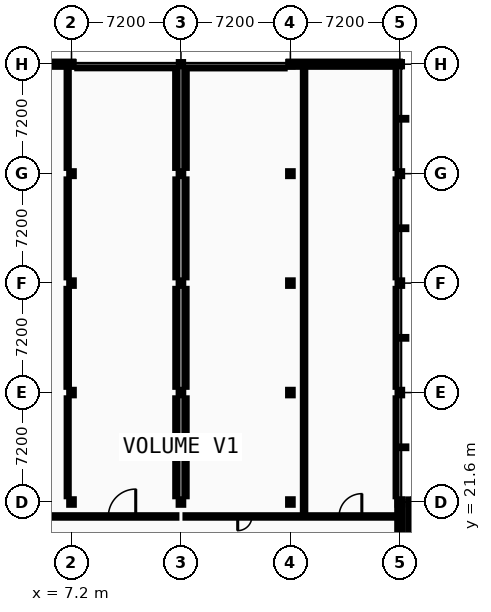
"""IFC4 building model, lengths in metres.
Left out: names, types, materials, properties, quantities, classifications, styles, units other than length and angle.
Written with IfcOpenShell. Run it as: python <this file> out.ifc"""

import sys

from ifc_helpers import new_model, si_unit, direction, frame, frame_2d, origin, origin_2d, place, context, subcontext, project, spatial, rectangle, i_section, extrude, element, fill, save


model = new_model("IFC4")
c1 = context("Model", 3, precision=1e-05, world=origin(), true_north=direction((0.0, 1.0)))
c2 = subcontext(c1, "Body", "Model", "MODEL_VIEW")
j1 = project(units=[si_unit("LENGTHUNIT", "METRE"), si_unit("PLANEANGLEUNIT", "RADIAN")], contexts=[c1])
p1 = place(None, origin())
s1 = spatial("IfcSite", under=j1, at=p1, CompositionType="ELEMENT")
p2 = place(p1, origin())
s2 = spatial("IfcBuilding", under=s1, at=p2, CompositionType="ELEMENT")
p3 = place(p2, frame((0.0, 0.0, 18.4)))
s3 = spatial("IfcBuildingStorey", under=s2, at=p3, CompositionType="ELEMENT", Elevation=18.4)
for number, where, z_axis, x_axis in (
    (1, (7.2, 21.6, 0.0), (0.0, 0.0, 1.0), (1.0, 0.0, 0.0)),
    (2, (7.2, 28.8, 0.0), (0.0, 0.0, 1.0), (1.0, 0.0, 0.0)),
    (3, (7.2, 36.0, 0.0), (0.0, 0.0, 1.0), (1.0, 0.0, 0.0)),
):
    element("IfcColumn", number, at=place(p3, frame(where, z_axis=z_axis, x_axis=x_axis)), inside=s3, PredefinedType="COLUMN", context=c2, shape_type="SweptSolid", body=[
        extrude(i_section(OverallWidth=0.3, OverallDepth=0.36, WebThickness=0.012, FlangeThickness=0.022, FilletRadius=0.027, at=origin_2d()), origin(), (0.0, 0.0, 1.0), 4.4),
    ])
p4 = place(p3, frame((7.2, 43.2, 0.0), z_axis=(0.0, 0.0, 1.0), x_axis=(1.0, 0.0, 0.0)))
e4 = element("IfcColumn", 4, at=p4, inside=s3, PredefinedType="COLUMN", context=c2, shape_type="SweptSolid", body=[
    extrude(i_section(OverallWidth=0.3, OverallDepth=0.32, WebThickness=0.011, FlangeThickness=0.021, FilletRadius=0.027, at=origin_2d()), origin(), (0.0, 0.0, 1.0), 4.4),
])
p5 = place(p3, frame((7.2, 50.4, 0.0), z_axis=(0.0, 0.0, 1.0), x_axis=(1.0, 0.0, 0.0)))
e5 = element("IfcColumn", 5, at=p5, inside=s3, PredefinedType="COLUMN", context=c2, shape_type="SweptSolid", body=[
    extrude(i_section(OverallWidth=0.28, OverallDepth=0.28, WebThickness=0.01, FlangeThickness=0.018, FilletRadius=0.024, at=origin_2d()), origin(), (0.0, 0.0, 1.0), 4.4),
])
for number, where, z_axis, x_axis in (
    (6, (14.4, 21.6, 0.0), (0.0, 0.0, 1.0), (1.0, 0.0, 0.0)),
    (7, (14.4, 28.8, 0.0), (0.0, 0.0, 1.0), (1.0, 0.0, 0.0)),
    (8, (14.4, 36.0, 0.0), (0.0, 0.0, 1.0), (1.0, 0.0, 0.0)),
):
    element("IfcColumn", number, at=place(p3, frame(where, z_axis=z_axis, x_axis=x_axis)), inside=s3, PredefinedType="COLUMN", context=c2, shape_type="SweptSolid", body=[
        extrude(i_section(OverallWidth=0.3, OverallDepth=0.36, WebThickness=0.012, FlangeThickness=0.022, FilletRadius=0.027, at=origin_2d()), origin(), (0.0, 0.0, 1.0), 4.4),
    ])
p6 = place(p3, frame((14.4, 43.2, 0.0), z_axis=(0.0, 0.0, 1.0), x_axis=(1.0, 0.0, 0.0)))
e9 = element("IfcColumn", 9, at=p6, inside=s3, PredefinedType="COLUMN", context=c2, shape_type="SweptSolid", body=[
    extrude(i_section(OverallWidth=0.3, OverallDepth=0.32, WebThickness=0.011, FlangeThickness=0.021, FilletRadius=0.027, at=origin_2d()), origin(), (0.0, 0.0, 1.0), 4.4),
])
p7 = place(p3, frame((14.4, 50.4, 0.0), z_axis=(0.0, 0.0, 1.0), x_axis=(1.0, 0.0, 0.0)))
e10 = element("IfcColumn", 10, at=p7, inside=s3, PredefinedType="COLUMN", context=c2, shape_type="SweptSolid", body=[
    extrude(i_section(OverallWidth=0.28, OverallDepth=0.28, WebThickness=0.01, FlangeThickness=0.018, FilletRadius=0.024, at=origin_2d()), origin(), (0.0, 0.0, 1.0), 4.4),
])
for number, where, z_axis, x_axis in (
    (11, (21.6, 21.6, 0.0), (0.0, 0.0, 1.0), (1.0, 0.0, 0.0)),
    (12, (21.6, 28.8, 0.0), (0.0, 0.0, 1.0), (1.0, 0.0, 0.0)),
    (13, (21.6, 36.0, 0.0), (0.0, 0.0, 1.0), (1.0, 0.0, 0.0)),
):
    element("IfcColumn", number, at=place(p3, frame(where, z_axis=z_axis, x_axis=x_axis)), inside=s3, PredefinedType="COLUMN", context=c2, shape_type="SweptSolid", body=[
        extrude(i_section(OverallWidth=0.3, OverallDepth=0.36, WebThickness=0.012, FlangeThickness=0.022, FilletRadius=0.027, at=origin_2d()), origin(), (0.0, 0.0, 1.0), 4.4),
    ])
p8 = place(p3, frame((21.6, 43.2, 0.0), z_axis=(0.0, 0.0, 1.0), x_axis=(1.0, 0.0, 0.0)))
e14 = element("IfcColumn", 14, at=p8, inside=s3, PredefinedType="COLUMN", context=c2, shape_type="SweptSolid", body=[
    extrude(i_section(OverallWidth=0.3, OverallDepth=0.32, WebThickness=0.011, FlangeThickness=0.021, FilletRadius=0.027, at=origin_2d()), origin(), (0.0, 0.0, 1.0), 4.4),
])
p9 = place(p3, frame((21.6, 50.4, 0.0), z_axis=(0.0, 0.0, 1.0), x_axis=(1.0, 0.0, 0.0)))
e15 = element("IfcColumn", 15, at=p9, inside=s3, PredefinedType="COLUMN", context=c2, shape_type="SweptSolid", body=[
    extrude(i_section(OverallWidth=0.28, OverallDepth=0.28, WebThickness=0.01, FlangeThickness=0.018, FilletRadius=0.024, at=origin_2d()), origin(), (0.0, 0.0, 1.0), 4.4),
])
for number, where, z_axis, x_axis in (
    (16, (28.8, 21.6, 0.0), (0.0, 0.0, 1.0), (1.0, 0.0, 0.0)),
    (17, (28.8, 28.8, 0.0), (0.0, 0.0, 1.0), (1.0, 0.0, 0.0)),
    (18, (28.8, 36.0, 0.0), (0.0, 0.0, 1.0), (1.0, 0.0, 0.0)),
):
    element("IfcColumn", number, at=place(p3, frame(where, z_axis=z_axis, x_axis=x_axis)), inside=s3, PredefinedType="COLUMN", context=c2, shape_type="SweptSolid", body=[
        extrude(i_section(OverallWidth=0.3, OverallDepth=0.36, WebThickness=0.012, FlangeThickness=0.022, FilletRadius=0.027, at=origin_2d()), origin(), (0.0, 0.0, 1.0), 4.4),
    ])
p10 = place(p3, frame((28.8, 43.2, 0.0), z_axis=(0.0, 0.0, 1.0), x_axis=(1.0, 0.0, 0.0)))
e19 = element("IfcColumn", 19, at=p10, inside=s3, PredefinedType="COLUMN", context=c2, shape_type="SweptSolid", body=[
    extrude(i_section(OverallWidth=0.3, OverallDepth=0.32, WebThickness=0.011, FlangeThickness=0.021, FilletRadius=0.027, at=origin_2d()), origin(), (0.0, 0.0, 1.0), 4.4),
])
p11 = place(p3, frame((28.8, 50.4, 0.0), z_axis=(0.0, 0.0, 1.0), x_axis=(1.0, 0.0, 0.0)))
e20 = element("IfcColumn", 20, at=p11, inside=s3, PredefinedType="COLUMN", context=c2, shape_type="SweptSolid", body=[
    extrude(i_section(OverallWidth=0.28, OverallDepth=0.28, WebThickness=0.01, FlangeThickness=0.018, FilletRadius=0.024, at=origin_2d()), origin(), (0.0, 0.0, 1.0), 4.4),
])
p12 = place(p3, frame((29.52, 21.6, 0.0), z_axis=(0.0, 0.0, 1.0), x_axis=(1.0, 0.0, 0.0)))
e21 = element("IfcColumn", 21, at=p12, inside=s3, PredefinedType="COLUMN", context=c2, shape_type="SweptSolid", body=[
    extrude(i_section(OverallWidth=0.24, OverallDepth=0.24, WebThickness=0.01, FlangeThickness=0.017, FilletRadius=0.021, at=origin_2d()), origin(), (0.0, 0.0, 1.0), 4.4),
])
p13 = place(p3, frame((7.31, 50.4, 0.0), z_axis=(0.0, 0.0, 1.0), x_axis=(-1.0, 0.0, 0.0)))
e22 = element("IfcWall", 22, at=p13, inside=s3, PredefinedType="STANDARD", context=c2, shape_type="SweptSolid", body=[
    extrude(rectangle(XDim=7.48, YDim=0.34, at=frame_2d((3.74, 0.0))), origin(), (0.0, 0.0, 1.0), 3.915),
])
p14 = place(p13, frame((1.61, 0.0, 0.95)))
e23 = element("IfcOpeningElement", 23, at=p14, cuts=e22, PredefinedType="OPENING", context=c2, shape_type="SweptSolid", body=[
    extrude(rectangle(XDim=1.268, YDim=1.368, at=frame_2d((0.634, 0.684))), frame((0.0, 0.18, 0.0), z_axis=(0.0, -1.0, 0.0), x_axis=(1.0, 0.0, 0.0)), (0.0, 0.0, 1.0), 0.36),
])
p15 = place(p13, frame((4.602, 0.0, 0.95)))
e24 = element("IfcOpeningElement", 24, at=p15, cuts=e22, PredefinedType="OPENING", context=c2, shape_type="SweptSolid", body=[
    extrude(rectangle(XDim=1.268, YDim=1.368, at=frame_2d((0.634, 0.684))), frame((0.0, 0.18, 0.0), z_axis=(0.0, -1.0, 0.0), x_axis=(1.0, 0.0, 0.0)), (0.0, 0.0, 1.0), 0.36),
])
p16 = place(p3, frame((28.8, 50.4, 0.0), z_axis=(0.0, 0.0, 1.0), x_axis=(-1.0, 0.0, 0.0)))
e25 = element("IfcWall", 25, at=p16, inside=s3, PredefinedType="STANDARD", context=c2, shape_type="SweptSolid", body=[
    extrude(rectangle(XDim=7.31, YDim=0.34, at=frame_2d((3.655, 0.0))), origin(), (0.0, 0.0, 1.0), 3.915),
])
p17 = place(p16, frame((1.763, 0.0, 0.95)))
e26 = element("IfcOpeningElement", 26, at=p17, cuts=e25, PredefinedType="OPENING", context=c2, shape_type="SweptSolid", body=[
    extrude(rectangle(XDim=0.86, YDim=1.404, at=frame_2d((0.43, 0.702))), frame((0.0, 0.18, 0.0), z_axis=(0.0, -1.0, 0.0), x_axis=(1.0, 0.0, 0.0)), (0.0, 0.0, 1.0), 0.36),
])
p18 = place(p16, frame((4.687, 0.0, 0.95)))
e27 = element("IfcOpeningElement", 27, at=p18, cuts=e25, PredefinedType="OPENING", context=c2, shape_type="SweptSolid", body=[
    extrude(rectangle(XDim=0.86, YDim=1.404, at=frame_2d((0.43, 0.702))), frame((0.0, 0.18, 0.0), z_axis=(0.0, -1.0, 0.0), x_axis=(1.0, 0.0, 0.0)), (0.0, 0.0, 1.0), 0.36),
])
p19 = place(p3, frame((28.8, 14.45, 0.0), z_axis=(0.0, 0.0, 1.0), x_axis=(0.0, 1.0, 0.0)))
e28 = element("IfcWall", 28, at=p19, inside=s3, PredefinedType="STANDARD", context=c2, shape_type="SweptSolid", body=[
    extrude(rectangle(XDim=7.15, YDim=0.34, at=frame_2d((3.575, 0.0))), origin(), (0.0, 0.0, 1.0), 4.215),
])
p20 = place(p19, frame((1.579, 0.0, 0.95)))
e29 = element("IfcOpeningElement", 29, at=p20, cuts=e28, PredefinedType="OPENING", context=c2, shape_type="SweptSolid", body=[
    extrude(rectangle(XDim=1.132, YDim=1.404, at=frame_2d((0.566, 0.702))), frame((0.0, 0.18, 0.0), z_axis=(0.0, -1.0, 0.0), x_axis=(1.0, 0.0, 0.0)), (0.0, 0.0, 1.0), 0.36),
])
p21 = place(p19, frame((4.439, 0.0, 0.95)))
e30 = element("IfcOpeningElement", 30, at=p21, cuts=e28, PredefinedType="OPENING", context=c2, shape_type="SweptSolid", body=[
    extrude(rectangle(XDim=1.132, YDim=1.404, at=frame_2d((0.566, 0.702))), frame((0.0, 0.18, 0.0), z_axis=(0.0, -1.0, 0.0), x_axis=(1.0, 0.0, 0.0)), (0.0, 0.0, 1.0), 0.36),
])
p22 = place(p3, frame((29.52, 21.77, 0.0), z_axis=(0.0, 0.0, 1.0), x_axis=(0.0, -1.0, 0.0)))
e31 = element("IfcWall", 31, at=p22, inside=s3, PredefinedType="STANDARD", context=c2, shape_type="SweptSolid", body=[
    extrude(rectangle(XDim=7.37, YDim=0.34, at=frame_2d((3.685, 0.0))), origin(), (0.0, 0.0, 1.0), 4.11),
])
p23 = place(p22, frame((1.577, 0.0, 0.95)))
e32 = element("IfcOpeningElement", 32, at=p23, cuts=e31, PredefinedType="OPENING", context=c2, shape_type="SweptSolid", body=[
    extrude(rectangle(XDim=1.268, YDim=1.404, at=frame_2d((0.634, 0.702))), frame((0.0, 0.18, 0.0), z_axis=(0.0, -1.0, 0.0), x_axis=(1.0, 0.0, 0.0)), (0.0, 0.0, 1.0), 0.36),
])
p24 = place(p22, frame((4.525, 0.0, 0.95)))
e33 = element("IfcOpeningElement", 33, at=p24, cuts=e31, PredefinedType="OPENING", context=c2, shape_type="SweptSolid", body=[
    extrude(rectangle(XDim=1.268, YDim=1.404, at=frame_2d((0.634, 0.702))), frame((0.0, 0.18, 0.0), z_axis=(0.0, -1.0, 0.0), x_axis=(1.0, 0.0, 0.0)), (0.0, 0.0, 1.0), 0.36),
])
p25 = place(p3, frame((0.2, 20.65, 0.0), z_axis=(0.0, 0.0, 1.0), x_axis=(1.0, 0.0, 0.0)))
e34 = element("IfcWall", 34, at=p25, inside=s3, PredefinedType="PARTITIONING", context=c2, shape_type="SweptSolid", body=[
    extrude(rectangle(XDim=13.9, YDim=0.16, at=frame_2d((6.95, 0.0))), origin(), (0.0, 0.0, 1.0), 4.215),
])
p26 = place(p25, frame((2.625, 0.0, 0.0)))
e35 = element("IfcOpeningElement", 35, at=p26, cuts=e34, PredefinedType="OPENING", context=c2, shape_type="SweptSolid", body=[
    extrude(rectangle(XDim=1.5, YDim=2.2, at=frame_2d((0.75, 1.1))), frame((0.0, 0.09, 0.0), z_axis=(0.0, -1.0, 0.0), x_axis=(1.0, 0.0, 0.0)), (0.0, 0.0, 1.0), 0.18),
])
p27 = place(p25, frame((9.425, 0.0, 0.0)))
e36 = element("IfcOpeningElement", 36, at=p27, cuts=e34, PredefinedType="OPENING", context=c2, shape_type="SweptSolid", body=[
    extrude(rectangle(XDim=1.8, YDim=2.3, at=frame_2d((0.9, 1.15))), frame((0.0, 0.09, 0.0), z_axis=(0.0, -1.0, 0.0), x_axis=(1.0, 0.0, 0.0)), (0.0, 0.0, 1.0), 0.18),
])
p28 = place(p3, frame((14.7, 20.65, 0.0), z_axis=(0.0, 0.0, 1.0), x_axis=(1.0, 0.0, 0.0)))
e37 = element("IfcWall", 37, at=p28, inside=s3, PredefinedType="PARTITIONING", context=c2, shape_type="SweptSolid", body=[
    extrude(rectangle(XDim=13.9, YDim=0.158, at=frame_2d((6.95, 0.0))), origin(), (0.0, 0.0, 1.0), 4.215),
])
p29 = place(p28, frame((10.1, 0.0, 0.0)))
e38 = element("IfcOpeningElement", 38, at=p29, cuts=e37, PredefinedType="OPENING", context=c2, shape_type="SweptSolid", body=[
    extrude(rectangle(XDim=1.5, YDim=2.2, at=frame_2d((0.75, 1.1))), frame((0.0, 0.089, 0.0), z_axis=(0.0, -1.0, 0.0), x_axis=(1.0, 0.0, 0.0)), (0.0, 0.0, 1.0), 0.178),
])
p30 = place(p28, frame((3.434, 0.0, 0.0)))
e39 = element("IfcOpeningElement", 39, at=p30, cuts=e37, PredefinedType="OPENING", context=c2, shape_type="SweptSolid", body=[
    extrude(rectangle(XDim=0.932, YDim=2.068, at=frame_2d((0.466, 1.034))), frame((0.0, 0.089, 0.0), z_axis=(0.0, -1.0, 0.0), x_axis=(1.0, 0.0, 0.0)), (0.0, 0.0, 1.0), 0.178),
])
p31 = place(p3, frame((7.58, 50.2, 0.0), z_axis=(0.0, 0.0, 1.0), x_axis=(1.0, 0.0, 0.0)))
e40 = element("IfcWall", 40, at=p31, inside=s3, PredefinedType="PARTITIONING", context=c2, shape_type="SweptSolid", body=[
    extrude(rectangle(XDim=6.44, YDim=0.135, at=frame_2d((3.22, 0.0))), origin(), (0.0, 0.0, 1.0), 3.915),
])
p32 = place(p3, frame((14.78, 50.2, 0.0), z_axis=(0.0, 0.0, 1.0), x_axis=(1.0, 0.0, 0.0)))
e41 = element("IfcWall", 41, at=p32, inside=s3, PredefinedType="PARTITIONING", context=c2, shape_type="SweptSolid", body=[
    extrude(rectangle(XDim=6.44, YDim=0.15, at=frame_2d((3.22, 0.0))), origin(), (0.0, 0.0, 1.0), 3.915),
])
p33 = place(p3, frame((6.95, 21.98, 0.0), z_axis=(0.0, 0.0, 1.0), x_axis=(0.0, 1.0, 0.0)))
e42 = element("IfcWall", 42, at=p33, inside=s3, PredefinedType="PARTITIONING", context=c2, shape_type="SweptSolid", body=[
    extrude(rectangle(XDim=6.44, YDim=0.135, at=frame_2d((3.22, 0.0))), origin(), (0.0, 0.0, 1.0), 3.91),
])
p34 = place(p3, frame((6.95, 29.18, 0.0), z_axis=(0.0, 0.0, 1.0), x_axis=(0.0, 1.0, 0.0)))
e43 = element("IfcWall", 43, at=p34, inside=s3, PredefinedType="PARTITIONING", context=c2, shape_type="SweptSolid", body=[
    extrude(rectangle(XDim=6.44, YDim=0.16, at=frame_2d((3.22, 0.0))), origin(), (0.0, 0.0, 1.0), 3.91),
])
p35 = place(p3, frame((6.95, 36.38, 0.0), z_axis=(0.0, 0.0, 1.0), x_axis=(0.0, 1.0, 0.0)))
e44 = element("IfcWall", 44, at=p35, inside=s3, PredefinedType="PARTITIONING", context=c2, shape_type="SweptSolid", body=[
    extrude(rectangle(XDim=6.44, YDim=0.15, at=frame_2d((3.22, 0.0))), origin(), (0.0, 0.0, 1.0), 3.91),
])
p36 = place(p3, frame((6.95, 43.58, 0.0), z_axis=(0.0, 0.0, 1.0), x_axis=(0.0, 1.0, 0.0)))
e45 = element("IfcWall", 45, at=p36, inside=s3, PredefinedType="PARTITIONING", context=c2, shape_type="SweptSolid", body=[
    extrude(rectangle(XDim=6.44, YDim=0.142, at=frame_2d((3.22, 0.0))), origin(), (0.0, 0.0, 1.0), 3.875),
])
p37 = place(p3, frame((14.1, 21.98, 0.0), z_axis=(0.0, 0.0, 1.0), x_axis=(0.0, 1.0, 0.0)))
e46 = element("IfcWall", 46, at=p37, inside=s3, PredefinedType="PARTITIONING", context=c2, shape_type="SweptSolid", body=[
    extrude(rectangle(XDim=6.44, YDim=0.15, at=frame_2d((3.22, 0.0))), origin(), (0.0, 0.0, 1.0), 3.91),
])
p38 = place(p3, frame((14.1, 29.18, 0.0), z_axis=(0.0, 0.0, 1.0), x_axis=(0.0, 1.0, 0.0)))
e47 = element("IfcWall", 47, at=p38, inside=s3, PredefinedType="PARTITIONING", context=c2, shape_type="SweptSolid", body=[
    extrude(rectangle(XDim=6.44, YDim=0.142, at=frame_2d((3.22, 0.0))), origin(), (0.0, 0.0, 1.0), 3.91),
])
p39 = place(p3, frame((14.1, 36.38, 0.0), z_axis=(0.0, 0.0, 1.0), x_axis=(0.0, 1.0, 0.0)))
e48 = element("IfcWall", 48, at=p39, inside=s3, PredefinedType="PARTITIONING", context=c2, shape_type="SweptSolid", body=[
    extrude(rectangle(XDim=6.44, YDim=0.135, at=frame_2d((3.22, 0.0))), origin(), (0.0, 0.0, 1.0), 4.215),
])
p40 = place(p3, frame((14.1, 43.58, 0.0), z_axis=(0.0, 0.0, 1.0), x_axis=(0.0, 1.0, 0.0)))
e49 = element("IfcWall", 49, at=p40, inside=s3, PredefinedType="PARTITIONING", context=c2, shape_type="SweptSolid", body=[
    extrude(rectangle(XDim=6.44, YDim=0.16, at=frame_2d((3.22, 0.0))), origin(), (0.0, 0.0, 1.0), 3.875),
])
p41 = place(p3, frame((14.7, 21.98, 0.0), z_axis=(0.0, 0.0, 1.0), x_axis=(0.0, 1.0, 0.0)))
e50 = element("IfcWall", 50, at=p41, inside=s3, PredefinedType="PARTITIONING", context=c2, shape_type="SweptSolid", body=[
    extrude(rectangle(XDim=6.44, YDim=0.15, at=frame_2d((3.22, 0.0))), origin(), (0.0, 0.0, 1.0), 3.91),
])
p42 = place(p3, frame((14.7, 29.18, 0.0), z_axis=(0.0, 0.0, 1.0), x_axis=(0.0, 1.0, 0.0)))
e51 = element("IfcWall", 51, at=p42, inside=s3, PredefinedType="PARTITIONING", context=c2, shape_type="SweptSolid", body=[
    extrude(rectangle(XDim=6.44, YDim=0.142, at=frame_2d((3.22, 0.0))), origin(), (0.0, 0.0, 1.0), 3.91),
])
p43 = place(p3, frame((14.7, 36.38, 0.0), z_axis=(0.0, 0.0, 1.0), x_axis=(0.0, 1.0, 0.0)))
e52 = element("IfcWall", 52, at=p43, inside=s3, PredefinedType="PARTITIONING", context=c2, shape_type="SweptSolid", body=[
    extrude(rectangle(XDim=6.44, YDim=0.135, at=frame_2d((3.22, 0.0))), origin(), (0.0, 0.0, 1.0), 4.215),
])
p44 = place(p3, frame((14.7, 43.58, 0.0), z_axis=(0.0, 0.0, 1.0), x_axis=(0.0, 1.0, 0.0)))
e53 = element("IfcWall", 53, at=p44, inside=s3, PredefinedType="PARTITIONING", context=c2, shape_type="SweptSolid", body=[
    extrude(rectangle(XDim=6.44, YDim=0.16, at=frame_2d((3.22, 0.0))), origin(), (0.0, 0.0, 1.0), 3.875),
])
p45 = place(p3, frame((22.5, 20.729, 0.0), z_axis=(0.0, 0.0, 1.0), x_axis=(0.0, 1.0, 0.0)))
e54 = element("IfcWall", 54, at=p45, inside=s3, PredefinedType="PARTITIONING", context=c2, shape_type="SweptSolid", body=[
    extrude(rectangle(XDim=29.471, YDim=0.158, at=frame_2d((14.735, 0.0))), origin(), (0.0, 0.0, 1.0), 4.215),
])
p46 = place(p3, frame((28.6, 21.98, 0.0), z_axis=(0.0, 0.0, 1.0), x_axis=(0.0, 1.0, 0.0)))
e55 = element("IfcWall", 55, at=p46, inside=s3, PredefinedType="PARTITIONING", context=c2, shape_type="SweptSolid", body=[
    extrude(rectangle(XDim=6.44, YDim=0.158, at=frame_2d((3.22, 0.0))), origin(), (0.0, 0.0, 1.0), 3.9),
])
for number, where, z_axis, x_axis in (
    (56, (28.6, 29.18, 0.0), (0.0, 0.0, 1.0), (0.0, 1.0, 0.0)),
    (57, (28.6, 36.38, 0.0), (0.0, 0.0, 1.0), (0.0, 1.0, 0.0)),
):
    element("IfcWall", number, at=place(p3, frame(where, z_axis=z_axis, x_axis=x_axis)), inside=s3, PredefinedType="PARTITIONING", context=c2, shape_type="SweptSolid", body=[
        extrude(rectangle(XDim=6.44, YDim=0.158, at=frame_2d((3.22, 0.0))), origin(), (0.0, 0.0, 1.0), 3.9),
    ])
p47 = place(p3, frame((28.6, 43.58, 0.0), z_axis=(0.0, 0.0, 1.0), x_axis=(0.0, 1.0, 0.0)))
e58 = element("IfcWall", 58, at=p47, inside=s3, PredefinedType="PARTITIONING", context=c2, shape_type="SweptSolid", body=[
    extrude(rectangle(XDim=6.44, YDim=0.158, at=frame_2d((3.22, 0.0))), origin(), (0.0, 0.0, 1.0), 3.865),
])
p48 = place(p17, origin())
e59 = element("IfcWindow", 59, at=p48, inside=s3, PartitioningType="SINGLE_PANEL", PredefinedType="WINDOW", context=c2, shape_type="SweptSolid", body=[
    extrude(rectangle(XDim=0.86, YDim=1.404, at=frame_2d((0.43, 0.702))), frame((0.0, 0.03, 0.0), z_axis=(0.0, -1.0, 0.0), x_axis=(1.0, 0.0, 0.0)), (0.0, 0.0, 1.0), 0.06),
])
fill(e26, e59)
p49 = place(p18, origin())
e60 = element("IfcWindow", 60, at=p49, inside=s3, PartitioningType="SINGLE_PANEL", PredefinedType="WINDOW", context=c2, shape_type="SweptSolid", body=[
    extrude(rectangle(XDim=0.86, YDim=1.404, at=frame_2d((0.43, 0.702))), frame((0.0, 0.03, 0.0), z_axis=(0.0, -1.0, 0.0), x_axis=(1.0, 0.0, 0.0)), (0.0, 0.0, 1.0), 0.06),
])
fill(e27, e60)
p50 = place(p21, origin())
e61 = element("IfcWindow", 61, at=p50, inside=s3, PartitioningType="SINGLE_PANEL", PredefinedType="WINDOW", context=c2, shape_type="SweptSolid", body=[
    extrude(rectangle(XDim=1.132, YDim=1.404, at=frame_2d((0.566, 0.702))), frame((0.0, 0.03, 0.0), z_axis=(0.0, -1.0, 0.0), x_axis=(1.0, 0.0, 0.0)), (0.0, 0.0, 1.0), 0.06),
])
fill(e30, e61)
p51 = place(p23, origin())
e62 = element("IfcWindow", 62, at=p51, inside=s3, PartitioningType="SINGLE_PANEL", PredefinedType="WINDOW", context=c2, shape_type="SweptSolid", body=[
    extrude(rectangle(XDim=1.268, YDim=1.404, at=frame_2d((0.634, 0.702))), frame((0.0, 0.03, 0.0), z_axis=(0.0, -1.0, 0.0), x_axis=(1.0, 0.0, 0.0)), (0.0, 0.0, 1.0), 0.06),
])
fill(e32, e62)
p52 = place(p29, frame((1.5, 0.0, 0.0), z_axis=(0.0, 0.0, 1.0), x_axis=(-1.0, 0.0, 0.0)))
e63 = element("IfcDoor", 63, at=p52, inside=s3, OperationType="DOUBLE_DOOR_SINGLE_SWING", PredefinedType="DOOR", context=c2, shape_type="SweptSolid", body=[
    extrude(rectangle(XDim=1.5, YDim=2.2, at=frame_2d((0.75, 1.1))), frame((0.0, 0.025, 0.0), z_axis=(0.0, -1.0, 0.0), x_axis=(1.0, 0.0, 0.0)), (0.0, 0.0, 1.0), 0.05),
])
fill(e38, e63)
p53 = place(p27, frame((1.8, 0.0, 0.0), z_axis=(0.0, 0.0, 1.0), x_axis=(-1.0, 0.0, 0.0)))
e64 = element("IfcDoor", 64, at=p53, inside=s3, OperationType="DOUBLE_DOOR_SINGLE_SWING", PredefinedType="DOOR", context=c2, shape_type="SweptSolid", body=[
    extrude(rectangle(XDim=1.8, YDim=2.3, at=frame_2d((0.9, 1.15))), frame((0.0, 0.025, 0.0), z_axis=(0.0, -1.0, 0.0), x_axis=(1.0, 0.0, 0.0)), (0.0, 0.0, 1.0), 0.05),
])
fill(e36, e64)
p54 = place(p30, frame((0.932, 0.0, 0.0), z_axis=(0.0, 0.0, 1.0), x_axis=(-1.0, 0.0, 0.0)))
e65 = element("IfcDoor", 65, at=p54, inside=s3, OperationType="SINGLE_SWING_LEFT", PredefinedType="DOOR", context=c2, shape_type="SweptSolid", body=[
    extrude(rectangle(XDim=0.932, YDim=2.068, at=frame_2d((0.466, 1.034))), frame((0.0, 0.025, 0.0), z_axis=(0.0, -1.0, 0.0), x_axis=(1.0, 0.0, 0.0)), (0.0, 0.0, 1.0), 0.05),
])
fill(e39, e65)
save(model, sys.argv[1])
